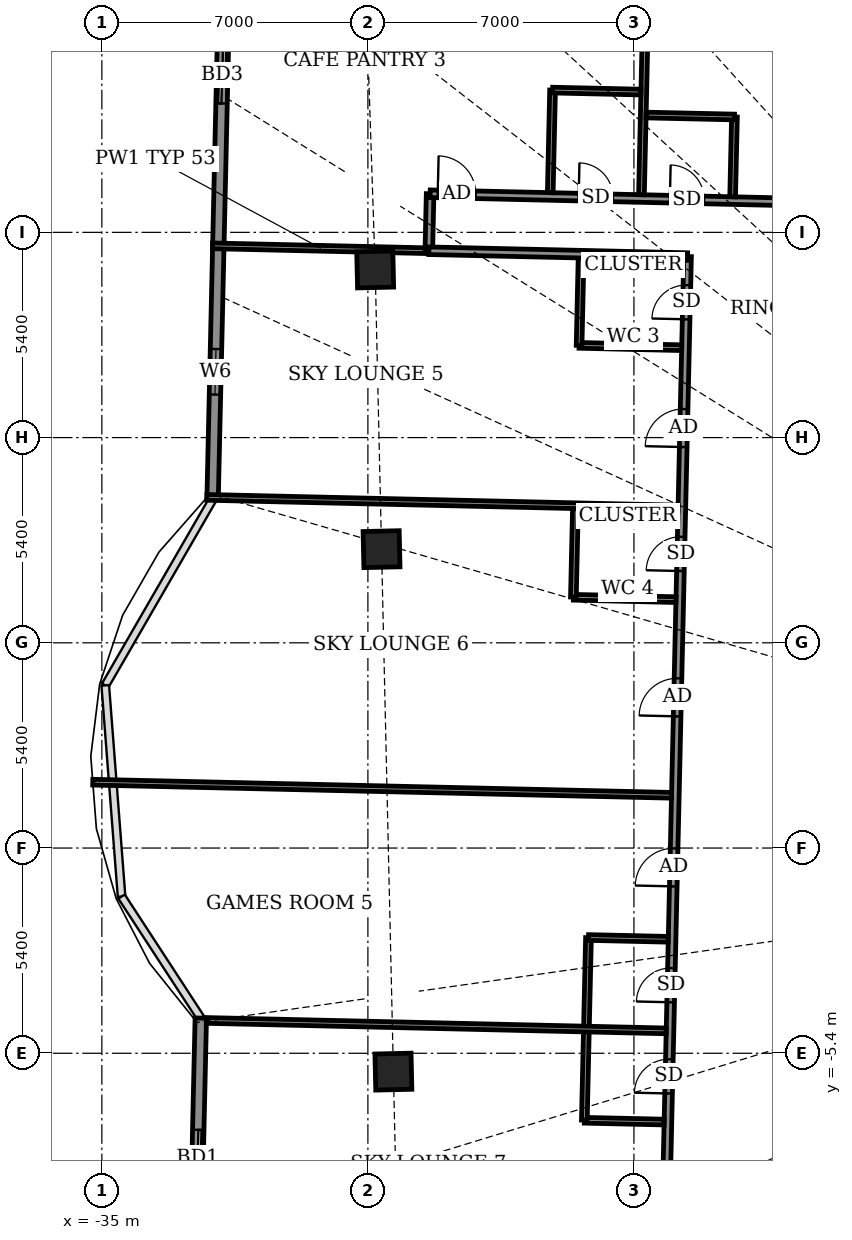
"""IFC4 building model, lengths in metres.
Left out: names, types, materials, properties, quantities, classifications, styles, units other than length and angle.
Written with IfcOpenShell. Run it as: python <this file> out.ifc"""

import sys

from ifc_helpers import new_model, si_unit, direction, frame, frame_2d, origin, origin_2d, place, context, subcontext, project, spatial, rectangle, extrude, element, fill, save


model = new_model("IFC4")
c1 = context("Model", 3, precision=1e-05, world=origin(), true_north=direction((0.0, 1.0)))
c2 = subcontext(c1, "Body", "Model", "MODEL_VIEW")
j1 = project(units=[si_unit("LENGTHUNIT", "METRE"), si_unit("PLANEANGLEUNIT", "RADIAN")], contexts=[c1])
p1 = place(None, origin())
s1 = spatial("IfcSite", under=j1, at=p1, CompositionType="ELEMENT")
p2 = place(p1, origin())
s2 = spatial("IfcBuilding", under=s1, at=p2, CompositionType="ELEMENT")
p3 = place(p2, frame((0.0, 0.0, 301.5)))
s3 = spatial("IfcBuildingStorey", under=s2, at=p3, CompositionType="ELEMENT", Elevation=301.5)
for number, where, z_axis, x_axis in (
    (1, (-27.329, -5.883, -0.55), (0.0, 0.0, 1.0), (0.023, -1.0, 0.0)),
    (2, (-27.808, 15.224, -0.55), (0.0, 0.0, 1.0), (0.023, -1.0, 0.0)),
    (3, (-27.641, 7.864, -0.55), (0.0, 0.0, 1.0), (0.023, -1.0, 0.0)),
):
    element("IfcColumn", number, at=place(p3, frame(where, z_axis=z_axis, x_axis=x_axis)), inside=s3, PredefinedType="COLUMN", context=c2, shape_type="SweptSolid", body=[
        extrude(rectangle(XDim=0.95, YDim=0.95, at=origin_2d()), origin(), (0.0, 0.0, 1.0), 4.6),
    ])
p4 = place(p3, frame((-31.735, 24.69, 0.0), z_axis=(0.0, 0.0, 1.0), x_axis=(-0.022653555426, -0.999743375285, 0.0)))
e4 = element("IfcWall", 4, at=p4, inside=s3, PredefinedType="SOLIDWALL", context=c2, shape_type="SweptSolid", body=[
    extrude(rectangle(XDim=15.53, YDim=0.3, at=frame_2d((7.765, 0.0))), origin(), (0.0, 0.0, 1.0), 2.25),
])
p5 = place(p4, frame((3.6, 0.0, 0.0)))
e5 = element("IfcOpeningElement", 5, at=p5, cuts=e4, PredefinedType="OPENING", context=c2, shape_type="SweptSolid", body=[
    extrude(rectangle(XDim=1.5, YDim=2.0, at=frame_2d((0.75, 1.0))), frame((0.0, 0.16, 0.0), z_axis=(0.0, -1.0, 0.0), x_axis=(1.0, 0.0, 0.0)), (0.0, 0.0, 1.0), 0.32),
])
p6 = place(p4, frame((11.562, 0.0, 0.5)))
e6 = element("IfcOpeningElement", 6, at=p6, cuts=e4, PredefinedType="OPENING", context=c2, shape_type="SweptSolid", body=[
    extrude(rectangle(XDim=1.2, YDim=1.1, at=frame_2d((0.6, 0.55))), frame((0.0, 0.16, 0.0), z_axis=(0.0, -1.0, 0.0), x_axis=(1.0, 0.0, 0.0)), (0.0, 0.0, 1.0), 0.32),
])
p7 = place(p3, frame((-32.397, -4.474, 0.0), z_axis=(0.0, 0.0, 1.0), x_axis=(-0.022668485183, -0.999743036875, 0.0)))
e7 = element("IfcWall", 7, at=p7, inside=s3, PredefinedType="SOLIDWALL", context=c2, shape_type="SweptSolid", body=[
    extrude(rectangle(XDim=15.929, YDim=0.3, at=frame_2d((7.964, 0.0))), origin(), (0.0, 0.0, 1.0), 2.55),
])
p8 = place(p7, frame((2.942, 0.0, 0.0)))
e8 = element("IfcOpeningElement", 8, at=p8, cuts=e7, PredefinedType="OPENING", context=c2, shape_type="SweptSolid", body=[
    extrude(rectangle(XDim=1.5, YDim=2.4, at=frame_2d((0.75, 1.2))), frame((0.0, 0.16, 0.0), z_axis=(0.0, -1.0, 0.0), x_axis=(1.0, 0.0, 0.0)), (0.0, 0.0, 1.0), 0.32),
])
p9 = place(p7, frame((10.504, 0.0, 0.9)))
e9 = element("IfcOpeningElement", 9, at=p9, cuts=e7, PredefinedType="OPENING", context=c2, shape_type="SweptSolid", body=[
    extrude(rectangle(XDim=2.4, YDim=1.5, at=frame_2d((1.2, 0.75))), frame((0.0, 0.16, 0.0), z_axis=(0.0, -1.0, 0.0), x_axis=(1.0, 0.0, 0.0)), (0.0, 0.0, 1.0), 0.32),
])
p10 = place(p3, frame((-34.666, 17.405, 0.0), z_axis=(0.0, 0.0, 1.0), x_axis=(0.022665943652, 0.999743094499, 0.0)))
e10 = element("IfcWall", 10, at=p10, inside=s3, PredefinedType="USERDEFINED", context=c2, shape_type="SweptSolid", body=[
    extrude(rectangle(XDim=6.0, YDim=0.55, at=frame_2d((3.0, 0.0))), origin(), (0.0, 0.0, 1.0), 0.8),
])
p11 = place(p3, frame((-20.216, -12.081, 0.0), z_axis=(0.0, 0.0, 1.0), x_axis=(0.02267447203, 0.999742901109, 0.0)))
e11 = element("IfcWall", 11, at=p11, inside=s3, PredefinedType="PARTITIONING", context=c2, shape_type="SweptSolid", body=[
    extrude(rectangle(XDim=27.65, YDim=0.2, at=frame_2d((13.825, 0.0))), origin(), (0.0, 0.0, 1.0), 2.25),
])
p12 = place(p11, frame((22.638, 0.0, 0.0)))
e12 = element("IfcOpeningElement", 12, at=p12, cuts=e11, PredefinedType="OPENING", context=c2, shape_type="SweptSolid", body=[
    extrude(rectangle(XDim=1.0, YDim=2.1, at=frame_2d((0.5, 1.05))), frame((0.0, 0.11, 0.0), z_axis=(0.0, -1.0, 0.0), x_axis=(1.0, 0.0, 0.0)), (0.0, 0.0, 1.0), 0.22),
])
p13 = place(p11, frame((26.0, 0.0, 0.0)))
e13 = element("IfcOpeningElement", 13, at=p13, cuts=e11, PredefinedType="OPENING", context=c2, shape_type="SweptSolid", body=[
    extrude(rectangle(XDim=0.9, YDim=2.1, at=frame_2d((0.45, 1.05))), frame((0.0, 0.11, 0.0), z_axis=(0.0, -1.0, 0.0), x_axis=(1.0, 0.0, 0.0)), (0.0, 0.0, 1.0), 0.22),
])
p14 = place(p11, frame((15.55, 0.0, 0.0)))
e14 = element("IfcOpeningElement", 14, at=p14, cuts=e11, PredefinedType="OPENING", context=c2, shape_type="SweptSolid", body=[
    extrude(rectangle(XDim=1.0, YDim=2.1, at=frame_2d((0.5, 1.05))), frame((0.0, 0.11, 0.0), z_axis=(0.0, -1.0, 0.0), x_axis=(1.0, 0.0, 0.0)), (0.0, 0.0, 1.0), 0.22),
])
p15 = place(p11, frame((19.375, 0.0, 0.0)))
e15 = element("IfcOpeningElement", 15, at=p15, cuts=e11, PredefinedType="OPENING", context=c2, shape_type="SweptSolid", body=[
    extrude(rectangle(XDim=0.9, YDim=2.1, at=frame_2d((0.45, 1.05))), frame((0.0, 0.11, 0.0), z_axis=(0.0, -1.0, 0.0), x_axis=(1.0, 0.0, 0.0)), (0.0, 0.0, 1.0), 0.22),
])
p16 = place(p11, frame((11.075, 0.0, 0.0)))
e16 = element("IfcOpeningElement", 16, at=p16, cuts=e11, PredefinedType="OPENING", context=c2, shape_type="SweptSolid", body=[
    extrude(rectangle(XDim=1.0, YDim=2.1, at=frame_2d((0.5, 1.05))), frame((0.0, 0.11, 0.0), z_axis=(0.0, -1.0, 0.0), x_axis=(1.0, 0.0, 0.0)), (0.0, 0.0, 1.0), 0.22),
])
p17 = place(p11, frame((8.025, 0.0, 0.0)))
e17 = element("IfcOpeningElement", 17, at=p17, cuts=e11, PredefinedType="OPENING", context=c2, shape_type="SweptSolid", body=[
    extrude(rectangle(XDim=0.9, YDim=2.1, at=frame_2d((0.45, 1.05))), frame((0.0, 0.11, 0.0), z_axis=(0.0, -1.0, 0.0), x_axis=(1.0, 0.0, 0.0)), (0.0, 0.0, 1.0), 0.22),
])
p18 = place(p11, frame((1.937, 0.0, 0.0)))
e18 = element("IfcOpeningElement", 18, at=p18, cuts=e11, PredefinedType="OPENING", context=c2, shape_type="SweptSolid", body=[
    extrude(rectangle(XDim=1.0, YDim=2.1, at=frame_2d((0.5, 1.05))), frame((0.0, 0.11, 0.0), z_axis=(0.0, -1.0, 0.0), x_axis=(1.0, 0.0, 0.0)), (0.0, 0.0, 1.0), 0.22),
])
p19 = place(p11, frame((5.625, 0.0, 0.0)))
e19 = element("IfcOpeningElement", 19, at=p19, cuts=e11, PredefinedType="OPENING", context=c2, shape_type="SweptSolid", body=[
    extrude(rectangle(XDim=0.9, YDim=2.1, at=frame_2d((0.45, 1.05))), frame((0.0, 0.11, 0.0), z_axis=(0.0, -1.0, 0.0), x_axis=(1.0, 0.0, 0.0)), (0.0, 0.0, 1.0), 0.22),
])
p20 = place(p3, frame((-22.305, -7.163, 0.0), z_axis=(0.0, 0.0, 1.0), x_axis=(0.999750703499, -0.022327804475, 0.0)))
e20 = element("IfcWall", 20, at=p20, inside=s3, PredefinedType="PARTITIONING", context=c2, shape_type="SweptSolid", body=[
    extrude(rectangle(XDim=2.099, YDim=0.15, at=frame_2d((1.05, 0.0))), origin(), (0.0, 0.0, 1.0), 2.75),
])
p21 = place(p3, frame((-22.305, -7.158, 0.0), z_axis=(0.0, 0.0, 1.0), x_axis=(0.022683280499, 0.999742701292, 0.0)))
e21 = element("IfcWall", 21, at=p21, inside=s3, PredefinedType="PARTITIONING", context=c2, shape_type="SweptSolid", body=[
    extrude(rectangle(XDim=4.8, YDim=0.15, at=frame_2d((2.4, 0.0))), origin(), (0.0, 0.0, 1.0), 2.75),
])
p22 = place(p3, frame((-32.248, -4.536, 0.0), z_axis=(0.0, 0.0, 1.0), x_axis=(0.999741439573, -0.022738821441, 0.0)))
e22 = element("IfcWall", 22, at=p22, inside=s3, PredefinedType="PARTITIONING", context=c2, shape_type="SweptSolid", body=[
    extrude(rectangle(XDim=12.1, YDim=0.15, at=frame_2d((6.05, 0.0))), origin(), (0.0, 0.0, 1.0), 2.25),
])
p23 = place(p3, frame((-22.196, -2.354, 0.0), z_axis=(0.0, 0.0, 1.0), x_axis=(0.999750761464, -0.022325208909, 0.0)))
e23 = element("IfcWall", 23, at=p23, inside=s3, PredefinedType="PARTITIONING", context=c2, shape_type="SweptSolid", body=[
    extrude(rectangle(XDim=2.1, YDim=0.15, at=frame_2d((1.05, 0.0))), origin(), (0.0, 0.0, 1.0), 2.75),
])
p24 = place(p3, frame((-35.239, 1.733, 0.0), z_axis=(0.0, 0.0, 1.0), x_axis=(0.999743504341, -0.02264785923, 0.0)))
e24 = element("IfcWall", 24, at=p24, inside=s3, PredefinedType="PARTITIONING", context=c2, shape_type="SweptSolid", body=[
    extrude(rectangle(XDim=15.232, YDim=0.15, at=frame_2d((7.616, 0.0))), origin(), (0.0, 0.0, 1.0), 0.93),
])
p25 = place(p3, frame((-22.593, 6.598, 0.0), z_axis=(0.0, 0.0, 1.0), x_axis=(0.999736155505, -0.022969966847, 0.0)))
e25 = element("IfcWall", 25, at=p25, inside=s3, PredefinedType="PARTITIONING", context=c2, shape_type="SweptSolid", body=[
    extrude(rectangle(XDim=2.7, YDim=0.15, at=frame_2d((1.35, 0.0))), origin(), (0.0, 0.0, 1.0), 2.65),
])
p26 = place(p3, frame((-22.593, 6.603, 0.0), z_axis=(0.0, 0.0, 1.0), x_axis=(0.02279059109, 0.999740260747, 0.0)))
e26 = element("IfcWall", 26, at=p26, inside=s3, PredefinedType="PARTITIONING", context=c2, shape_type="SweptSolid", body=[
    extrude(rectangle(XDim=2.324, YDim=0.15, at=frame_2d((1.162, 0.0))), origin(), (0.0, 0.0, 1.0), 2.65),
])
p27 = place(p3, frame((-32.236, 9.227, 0.0), z_axis=(0.0, 0.0, 1.0), x_axis=(0.999743195783, -0.022661475803, 0.0)))
e27 = element("IfcWall", 27, at=p27, inside=s3, PredefinedType="PARTITIONING", context=c2, shape_type="SweptSolid", body=[
    extrude(rectangle(XDim=12.4, YDim=0.15, at=frame_2d((6.2, 0.0))), origin(), (0.0, 0.0, 1.0), 2.25),
])
p28 = place(p3, frame((-22.443, 13.226, 0.0), z_axis=(0.0, 0.0, 1.0), x_axis=(0.999744627938, -0.022598205876, 0.0)))
e28 = element("IfcWall", 28, at=p28, inside=s3, PredefinedType="PARTITIONING", context=c2, shape_type="SweptSolid", body=[
    extrude(rectangle(XDim=2.701, YDim=0.15, at=frame_2d((1.351, 0.0))), origin(), (0.0, 0.0, 1.0), 2.45),
])
p29 = place(p3, frame((-22.443, 13.226, 0.0), z_axis=(0.0, 0.0, 1.0), x_axis=(0.022615284993, 0.999744241736, 0.0)))
e29 = element("IfcWall", 29, at=p29, inside=s3, PredefinedType="PARTITIONING", context=c2, shape_type="SweptSolid", body=[
    extrude(rectangle(XDim=2.299, YDim=0.15, at=frame_2d((1.15, 0.0))), origin(), (0.0, 0.0, 1.0), 2.45),
])
p30 = place(p3, frame((-32.086, 15.845, 0.0), z_axis=(0.0, 0.0, 1.0), x_axis=(0.999743823458, -0.022633768064, 0.0)))
e30 = element("IfcWall", 30, at=p30, inside=s3, PredefinedType="PARTITIONING", context=c2, shape_type="SweptSolid", body=[
    extrude(rectangle(XDim=5.695, YDim=0.15, at=frame_2d((2.848, 0.0))), origin(), (0.0, 0.0, 1.0), 2.25),
])
p31 = place(p3, frame((-26.397, 15.716, 0.0), z_axis=(0.0, 0.0, 1.0), x_axis=(0.022617910375, 0.999744182344, 0.0)))
e31 = element("IfcWall", 31, at=p31, inside=s3, PredefinedType="PARTITIONING", context=c2, shape_type="SweptSolid", body=[
    extrude(rectangle(XDim=1.5, YDim=0.2, at=frame_2d((0.75, 0.0))), origin(), (0.0, 0.0, 1.0), 2.45),
])
p32 = place(p3, frame((-26.396, 15.716, 0.0), z_axis=(0.0, 0.0, 1.0), x_axis=(0.999743996894, -0.022626106023, 0.0)))
e32 = element("IfcWall", 32, at=p32, inside=s3, PredefinedType="PARTITIONING", context=c2, shape_type="SweptSolid", body=[
    extrude(rectangle(XDim=6.809, YDim=0.2, at=frame_2d((3.404, 0.0))), origin(), (0.0, 0.0, 1.0), 2.25),
])
p33 = place(p3, frame((-26.362, 17.216, 0.0), z_axis=(0.0, 0.0, 1.0), x_axis=(0.999742445627, -0.022694545867, 0.0)))
e33 = element("IfcWall", 33, at=p33, inside=s3, PredefinedType="PARTITIONING", context=c2, shape_type="SweptSolid", body=[
    extrude(rectangle(XDim=54.509, YDim=0.2, at=frame_2d((27.255, 0.0))), origin(), (0.0, 0.0, 1.0), 2.1),
])
p34 = place(p33, frame((50.584, 0.0, 0.0)))
e34 = element("IfcOpeningElement", 34, at=p34, cuts=e33, PredefinedType="OPENING", context=c2, shape_type="SweptSolid", body=[
    extrude(rectangle(XDim=1.0, YDim=2.1, at=frame_2d((0.5, 1.05))), frame((0.0, 0.11, 0.0), z_axis=(0.0, -1.0, 0.0), x_axis=(1.0, 0.0, 0.0)), (0.0, 0.0, 1.0), 0.22),
])
p35 = place(p33, frame((44.509, 0.0, 0.0)))
e35 = element("IfcOpeningElement", 35, at=p35, cuts=e33, PredefinedType="OPENING", context=c2, shape_type="SweptSolid", body=[
    extrude(rectangle(XDim=0.9, YDim=2.1, at=frame_2d((0.45, 1.05))), frame((0.0, 0.11, 0.0), z_axis=(0.0, -1.0, 0.0), x_axis=(1.0, 0.0, 0.0)), (0.0, 0.0, 1.0), 0.22),
])
p36 = place(p33, frame((38.734, 0.0, 0.0)))
e36 = element("IfcOpeningElement", 36, at=p36, cuts=e33, PredefinedType="OPENING", context=c2, shape_type="SweptSolid", body=[
    extrude(rectangle(XDim=1.0, YDim=2.1, at=frame_2d((0.5, 1.05))), frame((0.0, 0.11, 0.0), z_axis=(0.0, -1.0, 0.0), x_axis=(1.0, 0.0, 0.0)), (0.0, 0.0, 1.0), 0.22),
])
p37 = place(p33, frame((33.034, 0.0, 0.0)))
e37 = element("IfcOpeningElement", 37, at=p37, cuts=e33, PredefinedType="OPENING", context=c2, shape_type="SweptSolid", body=[
    extrude(rectangle(XDim=0.9, YDim=2.1, at=frame_2d((0.45, 1.05))), frame((0.0, 0.11, 0.0), z_axis=(0.0, -1.0, 0.0), x_axis=(1.0, 0.0, 0.0)), (0.0, 0.0, 1.0), 0.22),
])
p38 = place(p33, frame((25.559, 0.0, 0.0)))
e38 = element("IfcOpeningElement", 38, at=p38, cuts=e33, PredefinedType="OPENING", context=c2, shape_type="SweptSolid", body=[
    extrude(rectangle(XDim=0.9, YDim=2.1, at=frame_2d((0.45, 1.05))), frame((0.0, 0.11, 0.0), z_axis=(0.0, -1.0, 0.0), x_axis=(1.0, 0.0, 0.0)), (0.0, 0.0, 1.0), 0.22),
])
p39 = place(p33, frame((22.884, 0.0, 0.0)))
e39 = element("IfcOpeningElement", 39, at=p39, cuts=e33, PredefinedType="OPENING", context=c2, shape_type="SweptSolid", body=[
    extrude(rectangle(XDim=0.9, YDim=2.1, at=frame_2d((0.45, 1.05))), frame((0.0, 0.11, 0.0), z_axis=(0.0, -1.0, 0.0), x_axis=(1.0, 0.0, 0.0)), (0.0, 0.0, 1.0), 0.22),
])
p40 = place(p33, frame((16.009, 0.0, 0.0)))
e40 = element("IfcOpeningElement", 40, at=p40, cuts=e33, PredefinedType="OPENING", context=c2, shape_type="SweptSolid", body=[
    extrude(rectangle(XDim=1.0, YDim=2.1, at=frame_2d((0.5, 1.05))), frame((0.0, 0.11, 0.0), z_axis=(0.0, -1.0, 0.0), x_axis=(1.0, 0.0, 0.0)), (0.0, 0.0, 1.0), 0.22),
])
p41 = place(p33, frame((10.184, 0.0, 0.0)))
e41 = element("IfcOpeningElement", 41, at=p41, cuts=e33, PredefinedType="OPENING", context=c2, shape_type="SweptSolid", body=[
    extrude(rectangle(XDim=1.0, YDim=2.1, at=frame_2d((0.5, 1.05))), frame((0.0, 0.11, 0.0), z_axis=(0.0, -1.0, 0.0), x_axis=(1.0, 0.0, 0.0)), (0.0, 0.0, 1.0), 0.22),
])
p42 = place(p33, frame((6.309, 0.0, 0.0)))
e42 = element("IfcOpeningElement", 42, at=p42, cuts=e33, PredefinedType="OPENING", context=c2, shape_type="SweptSolid", body=[
    extrude(rectangle(XDim=0.9, YDim=2.1, at=frame_2d((0.45, 1.05))), frame((0.0, 0.11, 0.0), z_axis=(0.0, -1.0, 0.0), x_axis=(1.0, 0.0, 0.0)), (0.0, 0.0, 1.0), 0.22),
])
p43 = place(p33, frame((0.2, 0.0, 0.0)))
e43 = element("IfcOpeningElement", 43, at=p43, cuts=e33, PredefinedType="OPENING", context=c2, shape_type="SweptSolid", body=[
    extrude(rectangle(XDim=1.0, YDim=2.1, at=frame_2d((0.5, 1.05))), frame((0.0, 0.11, 0.0), z_axis=(0.0, -1.0, 0.0), x_axis=(1.0, 0.0, 0.0)), (0.0, 0.0, 1.0), 0.22),
])
p44 = place(p33, frame((3.909, 0.0, 0.0)))
e44 = element("IfcOpeningElement", 44, at=p44, cuts=e33, PredefinedType="OPENING", context=c2, shape_type="SweptSolid", body=[
    extrude(rectangle(XDim=0.9, YDim=2.1, at=frame_2d((0.45, 1.05))), frame((0.0, 0.11, 0.0), z_axis=(0.0, -1.0, 0.0), x_axis=(1.0, 0.0, 0.0)), (0.0, 0.0, 1.0), 0.22),
])
p45 = place(p3, frame((-23.202, 17.244, 0.0), z_axis=(0.0, 0.0, 1.0), x_axis=(0.022515998029, 0.999746482781, 0.0)))
e45 = element("IfcWall", 45, at=p45, inside=s3, PredefinedType="PARTITIONING", context=c2, shape_type="SweptSolid", body=[
    extrude(rectangle(XDim=2.7, YDim=0.15, at=frame_2d((1.35, 0.0))), origin(), (0.0, 0.0, 1.0), 2.25),
])
p46 = place(p3, frame((-20.802, 17.19, 0.0), z_axis=(0.0, 0.0, 1.0), x_axis=(0.022637991173, 0.99974372784, 0.0)))
e46 = element("IfcWall", 46, at=p46, inside=s3, PredefinedType="PARTITIONING", context=c2, shape_type="SweptSolid", body=[
    extrude(rectangle(XDim=12.1, YDim=0.15, at=frame_2d((6.05, 0.0))), origin(), (0.0, 0.0, 1.0), 2.15),
])
p47 = place(p3, frame((-18.403, 17.135, 0.0), z_axis=(0.0, 0.0, 1.0), x_axis=(0.022895647347, 0.999737860308, 0.0)))
e47 = element("IfcWall", 47, at=p47, inside=s3, PredefinedType="PARTITIONING", context=c2, shape_type="SweptSolid", body=[
    extrude(rectangle(XDim=2.101, YDim=0.15, at=frame_2d((1.05, 0.0))), origin(), (0.0, 0.0, 1.0), 2.15),
])
p48 = place(p3, frame((-20.68, 19.287, 0.0), z_axis=(0.0, 0.0, 1.0), x_axis=(0.999749954681, -0.022361308448, 0.0)))
e48 = element("IfcWall", 48, at=p48, inside=s3, PredefinedType="PARTITIONING", context=c2, shape_type="SweptSolid", body=[
    extrude(rectangle(XDim=2.325, YDim=0.15, at=frame_2d((1.163, 0.0))), origin(), (0.0, 0.0, 1.0), 2.15),
])
p49 = place(p3, frame((-23.141, 19.943, 0.0), z_axis=(0.0, 0.0, 1.0), x_axis=(0.999750007167, -0.022358961731, 0.0)))
e49 = element("IfcWall", 49, at=p49, inside=s3, PredefinedType="PARTITIONING", context=c2, shape_type="SweptSolid", body=[
    extrude(rectangle(XDim=2.326, YDim=0.15, at=frame_2d((1.163, 0.0))), origin(), (0.0, 0.0, 1.0), 2.45),
])
p50 = place(p5, origin())
e50 = element("IfcDoor", 50, at=p50, inside=s3, OperationType="SLIDING_TO_LEFT", PredefinedType="DOOR", context=c2, shape_type="SweptSolid", body=[
    extrude(rectangle(XDim=1.5, YDim=2.0, at=frame_2d((0.75, 1.0))), frame((0.0, 0.025, 0.0), z_axis=(0.0, -1.0, 0.0), x_axis=(1.0, 0.0, 0.0)), (0.0, 0.0, 1.0), 0.05),
])
fill(e5, e50)
p51 = place(p6, origin())
e51 = element("IfcWindow", 51, at=p51, inside=s3, PartitioningType="SINGLE_PANEL", PredefinedType="WINDOW", context=c2, shape_type="SweptSolid", body=[
    extrude(rectangle(XDim=1.2, YDim=1.1, at=frame_2d((0.6, 0.55))), frame((0.0, 0.03, 0.0), z_axis=(0.0, -1.0, 0.0), x_axis=(1.0, 0.0, 0.0)), (0.0, 0.0, 1.0), 0.06),
])
fill(e6, e51)
p52 = place(p8, origin())
e52 = element("IfcDoor", 52, at=p52, inside=s3, OperationType="SLIDING_TO_LEFT", PredefinedType="DOOR", context=c2, shape_type="SweptSolid", body=[
    extrude(rectangle(XDim=1.5, YDim=2.4, at=frame_2d((0.75, 1.2))), frame((0.0, 0.025, 0.0), z_axis=(0.0, -1.0, 0.0), x_axis=(1.0, 0.0, 0.0)), (0.0, 0.0, 1.0), 0.05),
])
fill(e8, e52)
p53 = place(p42, origin())
e53 = element("IfcDoor", 53, at=p53, inside=s3, OperationType="SINGLE_SWING_RIGHT", PredefinedType="DOOR", context=c2, shape_type="SweptSolid", body=[
    extrude(rectangle(XDim=0.9, YDim=2.1, at=frame_2d((0.45, 1.05))), frame((0.0, 0.025, 0.0), z_axis=(0.0, -1.0, 0.0), x_axis=(1.0, 0.0, 0.0)), (0.0, 0.0, 1.0), 0.05),
])
fill(e42, e53)
p54 = place(p43, origin())
e54 = element("IfcDoor", 54, at=p54, inside=s3, OperationType="SINGLE_SWING_RIGHT", PredefinedType="DOOR", context=c2, shape_type="SweptSolid", body=[
    extrude(rectangle(XDim=1.0, YDim=2.1, at=frame_2d((0.5, 1.05))), frame((0.0, 0.025, 0.0), z_axis=(0.0, -1.0, 0.0), x_axis=(1.0, 0.0, 0.0)), (0.0, 0.0, 1.0), 0.05),
])
fill(e43, e54)
p55 = place(p44, origin())
e55 = element("IfcDoor", 55, at=p55, inside=s3, OperationType="SINGLE_SWING_LEFT", PredefinedType="DOOR", context=c2, shape_type="SweptSolid", body=[
    extrude(rectangle(XDim=0.9, YDim=2.1, at=frame_2d((0.45, 1.05))), frame((0.0, 0.025, 0.0), z_axis=(0.0, -1.0, 0.0), x_axis=(1.0, 0.0, 0.0)), (0.0, 0.0, 1.0), 0.05),
])
fill(e44, e55)
p56 = place(p12, origin())
e56 = element("IfcDoor", 56, at=p56, inside=s3, OperationType="SINGLE_SWING_LEFT", PredefinedType="DOOR", context=c2, shape_type="SweptSolid", body=[
    extrude(rectangle(XDim=1.0, YDim=2.1, at=frame_2d((0.5, 1.05))), frame((0.0, 0.025, 0.0), z_axis=(0.0, -1.0, 0.0), x_axis=(1.0, 0.0, 0.0)), (0.0, 0.0, 1.0), 0.05),
])
fill(e12, e56)
p57 = place(p13, origin())
e57 = element("IfcDoor", 57, at=p57, inside=s3, OperationType="SINGLE_SWING_RIGHT", PredefinedType="DOOR", context=c2, shape_type="SweptSolid", body=[
    extrude(rectangle(XDim=0.9, YDim=2.1, at=frame_2d((0.45, 1.05))), frame((0.0, 0.025, 0.0), z_axis=(0.0, -1.0, 0.0), x_axis=(1.0, 0.0, 0.0)), (0.0, 0.0, 1.0), 0.05),
])
fill(e13, e57)
p58 = place(p14, origin())
e58 = element("IfcDoor", 58, at=p58, inside=s3, OperationType="SINGLE_SWING_RIGHT", PredefinedType="DOOR", context=c2, shape_type="SweptSolid", body=[
    extrude(rectangle(XDim=1.0, YDim=2.1, at=frame_2d((0.5, 1.05))), frame((0.0, 0.025, 0.0), z_axis=(0.0, -1.0, 0.0), x_axis=(1.0, 0.0, 0.0)), (0.0, 0.0, 1.0), 0.05),
])
fill(e14, e58)
p59 = place(p15, origin())
e59 = element("IfcDoor", 59, at=p59, inside=s3, OperationType="SINGLE_SWING_LEFT", PredefinedType="DOOR", context=c2, shape_type="SweptSolid", body=[
    extrude(rectangle(XDim=0.9, YDim=2.1, at=frame_2d((0.45, 1.05))), frame((0.0, 0.025, 0.0), z_axis=(0.0, -1.0, 0.0), x_axis=(1.0, 0.0, 0.0)), (0.0, 0.0, 1.0), 0.05),
])
fill(e15, e59)
p60 = place(p16, origin())
e60 = element("IfcDoor", 60, at=p60, inside=s3, OperationType="SINGLE_SWING_LEFT", PredefinedType="DOOR", context=c2, shape_type="SweptSolid", body=[
    extrude(rectangle(XDim=1.0, YDim=2.1, at=frame_2d((0.5, 1.05))), frame((0.0, 0.025, 0.0), z_axis=(0.0, -1.0, 0.0), x_axis=(1.0, 0.0, 0.0)), (0.0, 0.0, 1.0), 0.05),
])
fill(e16, e60)
p61 = place(p17, origin())
e61 = element("IfcDoor", 61, at=p61, inside=s3, OperationType="SINGLE_SWING_RIGHT", PredefinedType="DOOR", context=c2, shape_type="SweptSolid", body=[
    extrude(rectangle(XDim=0.9, YDim=2.1, at=frame_2d((0.45, 1.05))), frame((0.0, 0.025, 0.0), z_axis=(0.0, -1.0, 0.0), x_axis=(1.0, 0.0, 0.0)), (0.0, 0.0, 1.0), 0.05),
])
fill(e17, e61)
p62 = place(p19, origin())
e62 = element("IfcDoor", 62, at=p62, inside=s3, OperationType="SINGLE_SWING_LEFT", PredefinedType="DOOR", context=c2, shape_type="SweptSolid", body=[
    extrude(rectangle(XDim=0.9, YDim=2.1, at=frame_2d((0.45, 1.05))), frame((0.0, 0.025, 0.0), z_axis=(0.0, -1.0, 0.0), x_axis=(1.0, 0.0, 0.0)), (0.0, 0.0, 1.0), 0.05),
])
fill(e19, e62)
save(model, sys.argv[1])
